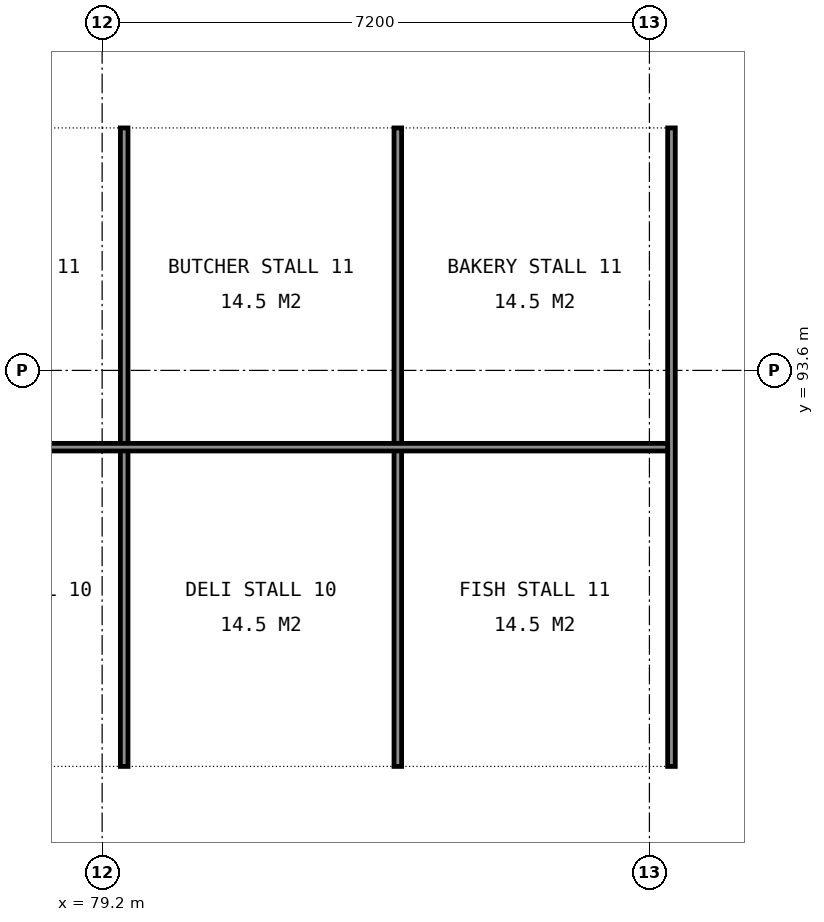
"""IFC4 building model, lengths in metres.
Left out: names, types, materials, properties, quantities, classifications, styles, units other than length and angle.
Written with IfcOpenShell. Run it as: python <this file> out.ifc"""

import sys

from ifc_helpers import new_model, si_unit, direction, frame, frame_2d, origin, place, context, subcontext, project, spatial, rectangle, extrude, element, save


model = new_model("IFC4")
c1 = context("Model", 3, precision=1e-05, world=origin(), true_north=direction((0.0, 1.0)))
c2 = subcontext(c1, "Body", "Model", "MODEL_VIEW")
j1 = project(units=[si_unit("LENGTHUNIT", "METRE"), si_unit("PLANEANGLEUNIT", "RADIAN")], contexts=[c1])
p1 = place(None, origin())
s1 = spatial("IfcSite", under=j1, at=p1, CompositionType="ELEMENT")
p2 = place(p1, origin())
s2 = spatial("IfcBuilding", under=s1, at=p2, CompositionType="ELEMENT")
p3 = place(p2, origin())
s3 = spatial("IfcBuildingStorey", under=s2, at=p3, CompositionType="ELEMENT", Elevation=0.0)
for number, where, z_axis, x_axis in (
    (1, (79.49, 88.39, 0.0), (0.0, 0.0, 1.0), (0.0, 1.0, 0.0)),
    (2, (83.09, 88.39, 0.0), (0.0, 0.0, 1.0), (0.0, 1.0, 0.0)),
    (3, (86.69, 88.39, 0.0), (0.0, 0.0, 1.0), (0.0, 1.0, 0.0)),
):
    element("IfcWall", number, at=place(p3, frame(where, z_axis=z_axis, x_axis=x_axis)), inside=s3, PredefinedType="PARTITIONING", context=c2, shape_type="SweptSolid", body=[
        extrude(rectangle(XDim=8.4, YDim=0.1, at=frame_2d((4.2, 0.0))), origin(), (0.0, 0.0, 1.0), 1.2),
    ])
p4 = place(p3, frame((75.94, 92.59, 0.0), z_axis=(0.0, 0.0, 1.0), x_axis=(1.0, 0.0, 0.0)))
e4 = element("IfcWall", 4, at=p4, inside=s3, PredefinedType="PARTITIONING", context=c2, shape_type="SweptSolid", body=[
    extrude(rectangle(XDim=10.7, YDim=0.1, at=frame_2d((5.35, 0.0))), origin(), (0.0, 0.0, 1.0), 1.2),
])
save(model, sys.argv[1])
